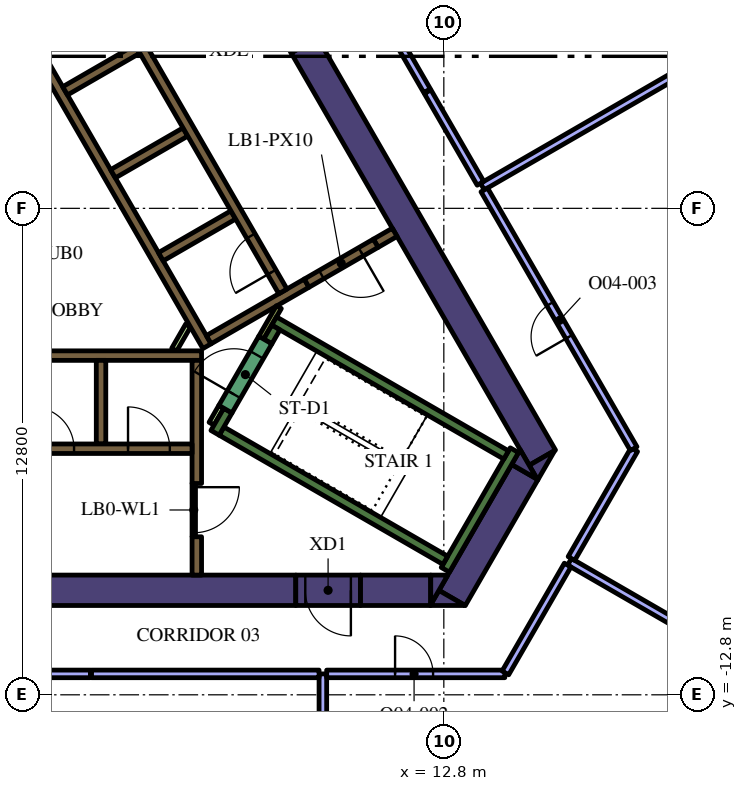
"""IFC4 building model, lengths in metres.
Left out: names, types, materials, properties, quantities, classifications, styles, units other than length and angle.
Written with IfcOpenShell. Run it as: python <this file> out.ifc"""

import sys

from ifc_helpers import new_model, si_unit, direction, frame, frame_2d, origin, place, context, subcontext, project, spatial, polyline, rectangle, outline, extrude, element, fill, save


model = new_model("IFC4")
c1 = context("Model", 3, precision=1e-05, world=origin(), true_north=direction((0.0, 1.0)))
c2 = subcontext(c1, "Body", "Model", "MODEL_VIEW")
j1 = project(units=[si_unit("LENGTHUNIT", "METRE"), si_unit("PLANEANGLEUNIT", "RADIAN")], contexts=[c1])
p1 = place(None, origin())
s1 = spatial("IfcSite", under=j1, at=p1, CompositionType="ELEMENT")
p2 = place(p1, origin())
s2 = spatial("IfcBuilding", under=s1, at=p2, CompositionType="ELEMENT")
p3 = place(p2, frame((0.0, 0.0, 183.6)))
s3 = spatial("IfcBuildingStorey", under=s2, at=p3, CompositionType="ELEMENT", Elevation=183.6)
p4 = place(p3, frame((9.129, 4.289, 0.0), z_axis=(0.0, 0.0, 1.0), x_axis=(0.499995742806, -0.866027861663, 0.0)))
e1 = element("IfcWall", 1, at=p4, inside=s3, PredefinedType="SOLIDWALL", context=c2, shape_type="SweptSolid", body=[
    extrude(rectangle(XDim=12.527, YDim=0.8, at=frame_2d((6.264, 0.0))), origin(), (0.0, 0.0, 1.0), 4.2),
])
p5 = place(p3, origin())
e2 = element("IfcWall", 2, at=p5, inside=s3, PredefinedType="SOLIDWALL", context=c2, shape_type="SweptSolid", body=[
    extrude(outline(polyline([(15.271, -7.15), (15.047, -6.762), (15.719, -6.374), (15.271, -7.15)])), origin(), (0.0, 0.0, 1.0), 4.2),
])
p6 = place(p3, frame((13.018, -10.252, 0.0), z_axis=(0.0, 0.0, 1.0), x_axis=(0.499984020225, 0.866034629516, 0.0)))
e3 = element("IfcWall", 3, at=p6, inside=s3, PredefinedType="SOLIDWALL", context=c2, shape_type="SweptSolid", body=[
    extrude(rectangle(XDim=3.824, YDim=0.8, at=frame_2d((1.912, 0.0))), origin(), (0.0, 0.0, 1.0), 4.2),
])
e4 = element("IfcWall", 4, at=p5, inside=s3, PredefinedType="SOLIDWALL", context=c2, shape_type="SweptSolid", body=[
    extrude(outline(polyline([(12.671, -10.053), (13.358, -10.45), (12.442, -10.45), (12.671, -10.053)])), origin(), (0.0, 0.0, 1.0), 4.2),
])
e5 = element("IfcWall", 5, at=p5, inside=s3, PredefinedType="SOLIDWALL", context=c2, shape_type="SweptSolid", body=[
    extrude(outline(polyline([(14.809, -6.35), (15.257, -7.126), (14.585, -6.738), (14.809, -6.35)])), origin(), (0.0, 0.0, 1.0), 4.2),
])
p7 = place(p3, frame((10.604, -10.05, 0.0), z_axis=(0.0, 0.0, 1.0), x_axis=(1.0, 0.0, 0.0)))
e6 = element("IfcWall", 6, at=p7, inside=s3, PredefinedType="SOLIDWALL", context=c2, shape_type="SweptSolid", body=[
    extrude(rectangle(XDim=1.849, YDim=0.8, at=frame_2d((0.925, 0.0))), origin(), (0.0, 0.0, 1.0), 4.2),
])
e7 = element("IfcWall", 7, at=p5, inside=s3, PredefinedType="SOLIDWALL", context=c2, shape_type="SweptSolid", body=[
    extrude(outline(polyline([(12.904, -9.65), (12.456, -10.426), (12.456, -9.65), (12.904, -9.65)])), origin(), (0.0, 0.0, 1.0), 4.2),
])
p8 = place(p3, frame((-13.378, -10.05, 0.0), z_axis=(0.0, 0.0, 1.0), x_axis=(1.0, 0.0, 0.0)))
e8 = element("IfcWall", 8, at=p8, inside=s3, PredefinedType="SOLIDWALL", context=c2, shape_type="SweptSolid", body=[
    extrude(rectangle(XDim=22.282, YDim=0.8, at=frame_2d((11.141, 0.0))), origin(), (0.0, 0.0, 1.0), 4.2),
])
p9 = place(p3, frame((12.84, -9.511, 0.0), z_axis=(0.0, 0.0, 1.0), x_axis=(0.499997733992, 0.866026712061, 0.0)))
e9 = element("IfcWall", 9, at=p9, inside=s3, PredefinedType="SOLIDWALL", context=c2, shape_type="SweptSolid", body=[
    extrude(rectangle(XDim=3.634, YDim=0.25, at=frame_2d((1.817, 0.0))), origin(), (0.0, 0.0, 1.0), 4.2),
])
p10 = place(p3, frame((12.84, -9.261, 0.0), z_axis=(0.0, 0.0, 1.0), x_axis=(-0.866013990052, 0.500019768644, 0.0)))
e10 = element("IfcWall", 10, at=p10, inside=s3, PredefinedType="SOLIDWALL", context=c2, shape_type="SweptSolid", body=[
    extrude(rectangle(XDim=6.8, YDim=0.25, at=frame_2d((3.4, 0.0))), origin(), (0.0, 0.0, 1.0), 4.2),
])
p11 = place(p3, frame((6.78, -5.906, 0.0), z_axis=(0.0, 0.0, 1.0), x_axis=(0.500223362819, 0.865896406789, 0.0)))
e11 = element("IfcWall", 11, at=p11, inside=s3, PredefinedType="SOLIDWALL", context=c2, shape_type="SweptSolid", body=[
    extrude(rectangle(XDim=0.675, YDim=0.25, at=frame_2d((0.337, 0.0))), origin(), (0.0, 0.0, 1.0), 4.2),
])
p12 = place(p3, frame((8.334, -2.964, 0.0), z_axis=(0.0, 0.0, 1.0), x_axis=(0.866016039709, -0.500016218704, 0.0)))
e12 = element("IfcWall", 12, at=p12, inside=s3, PredefinedType="SOLIDWALL", context=c2, shape_type="SweptSolid", body=[
    extrude(rectangle(XDim=7.05, YDim=0.25, at=frame_2d((3.525, 0.0))), origin(), (0.0, 0.0, 1.0), 4.2),
])
p13 = place(p3, frame((8.168, -3.503, 0.0), z_axis=(0.0, 0.0, 1.0), x_axis=(0.49972245349, 0.866185586049, 0.0)))
e13 = element("IfcWall", 13, at=p13, inside=s3, PredefinedType="SOLIDWALL", context=c2, shape_type="SweptSolid", body=[
    extrude(rectangle(XDim=0.425, YDim=0.25, at=frame_2d((0.212, 0.0))), origin(), (0.0, 0.0, 1.0), 4.2),
])
p14 = place(p3, frame((-5.545, -3.875, 0.0), z_axis=(0.0, 0.0, 1.0), x_axis=(1.0, 0.0, 0.0)))
e14 = element("IfcWall", 14, at=p14, inside=s3, PredefinedType="SOLIDWALL", context=c2, shape_type="SweptSolid", body=[
    extrude(rectangle(XDim=11.97, YDim=0.25, at=frame_2d((5.985, 0.0))), origin(), (0.0, 0.0, 1.0), 4.2),
])
p15 = place(p3, frame((6.3, -7.24, 0.0), z_axis=(0.0, 0.0, 1.0), x_axis=(0.0, 1.0, 0.0)))
e15 = element("IfcWall", 15, at=p15, inside=s3, PredefinedType="SOLIDWALL", context=c2, shape_type="SweptSolid", body=[
    extrude(rectangle(XDim=3.24, YDim=0.25, at=frame_2d((1.62, 0.0))), origin(), (0.0, 0.0, 1.0), 4.2),
])
p16 = place(p3, frame((6.3, -9.65, 0.0), z_axis=(0.0, 0.0, 1.0), x_axis=(0.0, 1.0, 0.0)))
e16 = element("IfcWall", 16, at=p16, inside=s3, PredefinedType="SOLIDWALL", context=c2, shape_type="SweptSolid", body=[
    extrude(rectangle(XDim=1.008, YDim=0.25, at=frame_2d((0.504, 0.0))), origin(), (0.0, 0.0, 1.0), 4.2),
])
p17 = place(p3, frame((3.78, -4.0, 0.0), z_axis=(0.0, 0.0, 1.0), x_axis=(0.0, -1.0, 0.0)))
e17 = element("IfcWall", 17, at=p17, inside=s3, PredefinedType="SOLIDWALL", context=c2, shape_type="SweptSolid", body=[
    extrude(rectangle(XDim=2.2, YDim=0.25, at=frame_2d((1.1, 0.0))), origin(), (0.0, 0.0, 1.0), 4.2),
])
p18 = place(p3, frame((11.507, -0.631, 0.0), z_axis=(0.0, 0.0, 1.0), x_axis=(-0.866093731455, -0.499881634324, 0.0)))
e18 = element("IfcWall", 18, at=p18, inside=s3, PredefinedType="SOLIDWALL", context=c2, shape_type="SweptSolid", body=[
    extrude(rectangle(XDim=0.575, YDim=0.25, at=frame_2d((0.288, 0.0))), origin(), (0.0, 0.0, 1.0), 4.2),
])
p19 = place(p3, frame((6.568, -3.627, 0.0), z_axis=(0.0, 0.0, 1.0), x_axis=(-0.499999455981, 0.866025717874, 0.0)))
e19 = element("IfcWall", 19, at=p19, inside=s3, PredefinedType="SOLIDWALL", context=c2, shape_type="SweptSolid", body=[
    extrude(rectangle(XDim=11.978, YDim=0.25, at=frame_2d((5.989, 0.0))), origin(), (0.0, 0.0, 1.0), 4.2),
])
for number, where, z_axis, x_axis in (
    (20, (2.834, 3.091, 0.0), (0.0, 0.0, 1.0), (0.866, 0.5, 0.0)),
    (21, (4.094, 0.909, 0.0), (0.0, 0.0, 1.0), (0.866, 0.5, 0.0)),
    (22, (5.354, -1.274, 0.0), (0.0, 0.0, 1.0), (0.866, 0.5, 0.0)),
):
    element("IfcWall", number, at=place(p3, frame(where, z_axis=z_axis, x_axis=x_axis)), inside=s3, PredefinedType="SOLIDWALL", context=c2, shape_type="SweptSolid", body=[
        extrude(rectangle(XDim=2.2, YDim=0.25, at=frame_2d((1.1, 0.0))), origin(), (0.0, 0.0, 1.0), 4.2),
    ])
p20 = place(p3, frame((6.614, -3.456, 0.0), z_axis=(0.0, 0.0, 1.0), x_axis=(0.866032512851, 0.499987686533, 0.0)))
e23 = element("IfcWall", 23, at=p20, inside=s3, PredefinedType="SOLIDWALL", context=c2, shape_type="SweptSolid", body=[
    extrude(rectangle(XDim=2.975, YDim=0.25, at=frame_2d((1.487, 0.0))), origin(), (0.0, 0.0, 1.0), 4.2),
])
p21 = place(p3, frame((6.945, -5.222, 0.0), z_axis=(0.0, 0.0, 1.0), x_axis=(-0.499818422106, -0.866130212453, 0.0)))
e24 = element("IfcWall", 24, at=p21, inside=s3, PredefinedType="PARTITIONING", context=c2, shape_type="SweptSolid", body=[
    extrude(rectangle(XDim=0.514, YDim=0.15, at=frame_2d((0.257, 0.0))), origin(), (0.0, 0.0, 1.0), 3.15),
])
p22 = place(p3, frame((8.459, -2.599, 0.0), z_axis=(0.0, 0.0, 1.0), x_axis=(-0.500041054325, -0.866001699761, 0.0)))
e25 = element("IfcWall", 25, at=p22, inside=s3, PredefinedType="PARTITIONING", context=c2, shape_type="SweptSolid", body=[
    extrude(rectangle(XDim=0.929, YDim=0.15, at=frame_2d((0.464, 0.0))), origin(), (0.0, 0.0, 1.0), 4.2),
])
p23 = place(p3, frame((5.705, -3.718, 0.0), z_axis=(0.0, 0.0, 1.0), x_axis=(0.499962090823, 0.866047289552, 0.0)))
e26 = element("IfcWall", 26, at=p23, inside=s3, PredefinedType="PARTITIONING", context=c2, shape_type="SweptSolid", body=[
    extrude(rectangle(XDim=0.735, YDim=0.15, at=frame_2d((0.367, 0.0))), origin(), (0.0, 0.0, 1.0), 3.15),
])
p24 = place(p3, frame((-6.175, -6.325, 0.0), z_axis=(0.0, 0.0, 1.0), x_axis=(1.0, 0.0, 0.0)))
e27 = element("IfcWall", 27, at=p24, inside=s3, PredefinedType="SOLIDWALL", context=c2, shape_type="SweptSolid", body=[
    extrude(rectangle(XDim=12.35, YDim=0.25, at=frame_2d((6.175, 0.0))), origin(), (0.0, 0.0, 1.0), 4.2),
])
p25 = place(p24, frame((0.585, 0.0, 0.0)))
e28 = element("IfcOpeningElement", 28, at=p25, cuts=e27, PredefinedType="OPENING", context=c2, shape_type="SweptSolid", body=[
    extrude(rectangle(XDim=1.1, YDim=2.1, at=frame_2d((0.55, 1.05))), frame((0.0, 0.135, 0.0), z_axis=(0.0, -1.0, 0.0), x_axis=(1.0, 0.0, 0.0)), (0.0, 0.0, 1.0), 0.27),
])
p26 = place(p24, frame((3.105, 0.0, 0.0)))
e29 = element("IfcOpeningElement", 29, at=p26, cuts=e27, PredefinedType="OPENING", context=c2, shape_type="SweptSolid", body=[
    extrude(rectangle(XDim=1.1, YDim=2.1, at=frame_2d((0.55, 1.05))), frame((0.0, 0.135, 0.0), z_axis=(0.0, -1.0, 0.0), x_axis=(1.0, 0.0, 0.0)), (0.0, 0.0, 1.0), 0.27),
])
p27 = place(p24, frame((5.625, 0.0, 0.0)))
e30 = element("IfcOpeningElement", 30, at=p27, cuts=e27, PredefinedType="OPENING", context=c2, shape_type="SweptSolid", body=[
    extrude(rectangle(XDim=1.1, YDim=2.1, at=frame_2d((0.55, 1.05))), frame((0.0, 0.135, 0.0), z_axis=(0.0, -1.0, 0.0), x_axis=(1.0, 0.0, 0.0)), (0.0, 0.0, 1.0), 0.27),
])
p28 = place(p24, frame((8.145, 0.0, 0.0)))
e31 = element("IfcOpeningElement", 31, at=p28, cuts=e27, PredefinedType="OPENING", context=c2, shape_type="SweptSolid", body=[
    extrude(rectangle(XDim=1.1, YDim=2.1, at=frame_2d((0.55, 1.05))), frame((0.0, 0.135, 0.0), z_axis=(0.0, -1.0, 0.0), x_axis=(1.0, 0.0, 0.0)), (0.0, 0.0, 1.0), 0.27),
])
p29 = place(p24, frame((10.665, 0.0, 0.0)))
e32 = element("IfcOpeningElement", 32, at=p29, cuts=e27, PredefinedType="OPENING", context=c2, shape_type="SweptSolid", body=[
    extrude(rectangle(XDim=1.1, YDim=2.1, at=frame_2d((0.55, 1.05))), frame((0.0, 0.135, 0.0), z_axis=(0.0, -1.0, 0.0), x_axis=(1.0, 0.0, 0.0)), (0.0, 0.0, 1.0), 0.27),
])
p30 = place(p3, frame((8.565, -2.185, 0.0), z_axis=(0.0, 0.0, 1.0), x_axis=(-0.499997954832, 0.866026584559, 0.0)))
e33 = element("IfcWall", 33, at=p30, inside=s3, PredefinedType="SOLIDWALL", context=c2, shape_type="SweptSolid", body=[
    extrude(rectangle(XDim=12.35, YDim=0.25, at=frame_2d((6.175, 0.0))), origin(), (0.0, 0.0, 1.0), 4.2),
])
p31 = place(p30, frame((0.585, 0.0, 0.0)))
e34 = element("IfcOpeningElement", 34, at=p31, cuts=e33, PredefinedType="OPENING", context=c2, shape_type="SweptSolid", body=[
    extrude(rectangle(XDim=1.1, YDim=2.1, at=frame_2d((0.55, 1.05))), frame((0.0, 0.135, 0.0), z_axis=(0.0, -1.0, 0.0), x_axis=(1.0, 0.0, 0.0)), (0.0, 0.0, 1.0), 0.27),
])
p32 = place(p3, frame((7.053, -5.284, 0.0), z_axis=(0.0, 0.0, 1.0), x_axis=(0.500078061341, 0.865980330357, 0.0)))
e35 = element("IfcWall", 35, at=p32, inside=s3, PredefinedType="SOLIDWALL", context=c2, shape_type="SweptSolid", body=[
    extrude(rectangle(XDim=2.1, YDim=0.4, at=frame_2d((1.05, 0.0))), origin(), (0.0, 0.0, 1.0), 4.2),
])
p33 = place(p32, frame((0.45, 0.0, 0.0)))
e36 = element("IfcOpeningElement", 36, at=p33, cuts=e35, PredefinedType="OPENING", context=c2, shape_type="SweptSolid", body=[
    extrude(rectangle(XDim=1.2, YDim=2.1, at=frame_2d((0.6, 1.05))), frame((0.0, 0.21, 0.0), z_axis=(0.0, -1.0, 0.0), x_axis=(1.0, 0.0, 0.0)), (0.0, 0.0, 1.0), 0.42),
])
p34 = place(p3, frame((6.22, -7.237, 0.0), z_axis=(0.0, 0.0, 1.0), x_axis=(0.0, -1.0, 0.0)))
e37 = element("IfcWall", 37, at=p34, inside=s3, PredefinedType="PARTITIONING", context=c2, shape_type="SweptSolid", body=[
    extrude(rectangle(XDim=1.4, YDim=0.09, at=frame_2d((0.7, 0.0))), origin(), (0.0, 0.0, 1.0), 3.15),
])
p35 = place(p34, frame((0.1, 0.0, 0.0)))
e38 = element("IfcOpeningElement", 38, at=p35, cuts=e37, PredefinedType="OPENING", context=c2, shape_type="SweptSolid", body=[
    extrude(rectangle(XDim=1.2, YDim=2.1, at=frame_2d((0.6, 1.05))), frame((0.0, 0.055, 0.0), z_axis=(0.0, -1.0, 0.0), x_axis=(1.0, 0.0, 0.0)), (0.0, 0.0, 1.0), 0.11),
])
p36 = place(p3, frame((11.009, -0.919, 0.0), z_axis=(0.0, 0.0, 1.0), x_axis=(-0.866059744384, -0.49994051562, 0.0)))
e39 = element("IfcWall", 39, at=p36, inside=s3, PredefinedType="SOLIDWALL", context=c2, shape_type="SweptSolid", body=[
    extrude(rectangle(XDim=2.1, YDim=0.25, at=frame_2d((1.05, 0.0))), origin(), (0.0, 0.0, 1.0), 4.2),
])
p37 = place(p36, frame((0.45, 0.0, 0.0)))
e40 = element("IfcOpeningElement", 40, at=p37, cuts=e39, PredefinedType="OPENING", context=c2, shape_type="SweptSolid", body=[
    extrude(rectangle(XDim=1.2, YDim=2.1, at=frame_2d((0.6, 1.05))), frame((0.0, 0.135, 0.0), z_axis=(0.0, -1.0, 0.0), x_axis=(1.0, 0.0, 0.0)), (0.0, 0.0, 1.0), 0.27),
])
p38 = place(p3, frame((10.604, -10.05, 0.0), z_axis=(0.0, 0.0, 1.0), x_axis=(-1.0, 0.0, 0.0)))
e41 = element("IfcWall", 41, at=p38, inside=s3, PredefinedType="SOLIDWALL", context=c2, shape_type="SweptSolid", body=[
    extrude(rectangle(XDim=1.7, YDim=0.8, at=frame_2d((0.85, 0.0))), origin(), (0.0, 0.0, 1.0), 4.2),
])
p39 = place(p38, frame((0.25, 0.0, 0.0)))
e42 = element("IfcOpeningElement", 42, at=p39, cuts=e41, PredefinedType="OPENING", context=c2, shape_type="SweptSolid", body=[
    extrude(rectangle(XDim=1.2, YDim=2.1, at=frame_2d((0.6, 1.05))), frame((0.0, 0.41, 0.0), z_axis=(0.0, -1.0, 0.0), x_axis=(1.0, 0.0, 0.0)), (0.0, 0.0, 1.0), 0.82),
])
p40 = place(p3, frame((8.279, 5.761, 0.0), z_axis=(0.0, 0.0, 1.0), x_axis=(0.500062241894, -0.865989465428, 0.0)))
e43 = element("IfcWall", 43, at=p40, inside=s3, PredefinedType="SOLIDWALL", context=c2, shape_type="SweptSolid", body=[
    extrude(rectangle(XDim=1.7, YDim=0.8, at=frame_2d((0.85, 0.0))), origin(), (0.0, 0.0, 1.0), 4.2),
])
p41 = place(p40, frame((0.25, 0.0, 0.0)))
e44 = element("IfcOpeningElement", 44, at=p41, cuts=e43, PredefinedType="OPENING", context=c2, shape_type="SweptSolid", body=[
    extrude(rectangle(XDim=1.2, YDim=2.1, at=frame_2d((0.6, 1.05))), frame((0.0, 0.41, 0.0), z_axis=(0.0, -1.0, 0.0), x_axis=(1.0, 0.0, 0.0)), (0.0, 0.0, 1.0), 0.82),
])
p42 = place(p3, frame((9.617, -12.25, 0.0), z_axis=(0.0, 0.0, 1.0), x_axis=(0.0, -1.0, 0.0)))
e45 = element("IfcWall", 45, at=p42, inside=s3, PredefinedType="PARTITIONING", context=c2, shape_type="SweptSolid", body=[
    extrude(rectangle(XDim=7.761, YDim=0.2, at=frame_2d((3.881, 0.0))), origin(), (0.0, 0.0, 1.0), 3.15),
])
p43 = place(p3, frame((-3.5, -12.25, 0.0), z_axis=(0.0, 0.0, 1.0), x_axis=(1.0, 0.0, 0.0)))
e46 = element("IfcWall", 46, at=p43, inside=s3, PredefinedType="PARTITIONING", context=c2, shape_type="SweptSolid", body=[
    extrude(rectangle(XDim=7.0, YDim=0.2, at=frame_2d((3.5, 0.0))), origin(), (0.0, 0.0, 1.0), 3.15),
])
p44 = place(p43, frame((3.0, 0.0, 0.0)))
e47 = element("IfcOpeningElement", 47, at=p44, cuts=e46, PredefinedType="OPENING", context=c2, shape_type="SweptSolid", body=[
    extrude(rectangle(XDim=1.0, YDim=2.1, at=frame_2d((0.5, 1.05))), frame((0.0, 0.11, 0.0), z_axis=(0.0, -1.0, 0.0), x_axis=(1.0, 0.0, 0.0)), (0.0, 0.0, 1.0), 0.22),
])
p45 = place(p3, frame((3.53, -12.25, 0.0), z_axis=(0.0, 0.0, 1.0), x_axis=(1.0, 0.0, 0.0)))
e48 = element("IfcWall", 48, at=p45, inside=s3, PredefinedType="PARTITIONING", context=c2, shape_type="SweptSolid", body=[
    extrude(rectangle(XDim=5.987, YDim=0.2, at=frame_2d((2.994, 0.0))), origin(), (0.0, 0.0, 1.0), 3.15),
])
p46 = place(p3, frame((16.108, -9.3, 0.0), z_axis=(0.0, 0.0, 1.0), x_axis=(0.866027180319, -0.499996922939, 0.0)))
e49 = element("IfcWall", 49, at=p46, inside=s3, PredefinedType="PARTITIONING", context=c2, shape_type="SweptSolid", body=[
    extrude(rectangle(XDim=10.754, YDim=0.2, at=frame_2d((5.377, 0.0))), origin(), (0.0, 0.0, 1.0), 3.15),
])
p47 = place(p3, frame((9.717, -12.25, 0.0), z_axis=(0.0, 0.0, 1.0), x_axis=(1.0, 0.0, 0.0)))
e50 = element("IfcWall", 50, at=p47, inside=s3, PredefinedType="PARTITIONING", context=c2, shape_type="SweptSolid", body=[
    extrude(rectangle(XDim=4.688, YDim=0.2, at=frame_2d((2.344, 0.0))), origin(), (0.0, 0.0, 1.0), 3.15),
])
p48 = place(p47, frame((1.8, 0.0, 0.0)))
e51 = element("IfcOpeningElement", 51, at=p48, cuts=e50, PredefinedType="OPENING", context=c2, shape_type="SweptSolid", body=[
    extrude(rectangle(XDim=1.0, YDim=2.1, at=frame_2d((0.5, 1.05))), frame((0.0, 0.11, 0.0), z_axis=(0.0, -1.0, 0.0), x_axis=(1.0, 0.0, 0.0)), (0.0, 0.0, 1.0), 0.22),
])
p49 = place(p3, frame((14.42, -12.224, 0.0), z_axis=(0.0, 0.0, 1.0), x_axis=(0.500001965626, 0.866024268927, 0.0)))
e52 = element("IfcWall", 52, at=p49, inside=s3, PredefinedType="PARTITIONING", context=c2, shape_type="SweptSolid", body=[
    extrude(rectangle(XDim=3.276, YDim=0.2, at=frame_2d((1.638, 0.0))), origin(), (0.0, 0.0, 1.0), 3.15),
])
p50 = place(p3, frame((13.815, 0.572, 0.0), z_axis=(0.0, 0.0, 1.0), x_axis=(0.866036391575, 0.499980968105, 0.0)))
e53 = element("IfcWall", 53, at=p50, inside=s3, PredefinedType="PARTITIONING", context=c2, shape_type="SweptSolid", body=[
    extrude(rectangle(XDim=8.42, YDim=0.2, at=frame_2d((4.21, 0.0))), origin(), (0.0, 0.0, 1.0), 3.15),
])
p51 = place(p3, frame((16.158, -9.213, 0.0), z_axis=(0.0, 0.0, 1.0), x_axis=(0.499990919662, 0.866030646256, 0.0)))
e54 = element("IfcWall", 54, at=p51, inside=s3, PredefinedType="PARTITIONING", context=c2, shape_type="SweptSolid", body=[
    extrude(rectangle(XDim=3.306, YDim=0.2, at=frame_2d((1.653, 0.0))), origin(), (0.0, 0.0, 1.0), 3.15),
])
p52 = place(p3, frame((17.796, -6.324, 0.0), z_axis=(0.0, 0.0, 1.0), x_axis=(-0.500026166427, 0.866010296064, 0.0)))
e55 = element("IfcWall", 55, at=p52, inside=s3, PredefinedType="PARTITIONING", context=c2, shape_type="SweptSolid", body=[
    extrude(rectangle(XDim=7.863, YDim=0.2, at=frame_2d((3.931, 0.0))), origin(), (0.0, 0.0, 1.0), 3.15),
])
p53 = place(p52, frame((3.4, 0.0, 0.0)))
e56 = element("IfcOpeningElement", 56, at=p53, cuts=e55, PredefinedType="OPENING", context=c2, shape_type="SweptSolid", body=[
    extrude(rectangle(XDim=1.0, YDim=2.1, at=frame_2d((0.5, 1.05))), frame((0.0, 0.11, 0.0), z_axis=(0.0, -1.0, 0.0), x_axis=(1.0, 0.0, 0.0)), (0.0, 0.0, 1.0), 0.22),
])
p54 = place(p3, frame((12.359, 3.094, 0.0), z_axis=(0.0, 0.0, 1.0), x_axis=(-0.500010275428, 0.866019471182, 0.0)))
e57 = element("IfcWall", 57, at=p54, inside=s3, PredefinedType="PARTITIONING", context=c2, shape_type="SweptSolid", body=[
    extrude(rectangle(XDim=7.0, YDim=0.2, at=frame_2d((3.5, 0.0))), origin(), (0.0, 0.0, 1.0), 3.15),
])
p55 = place(p3, frame((13.765, 0.659, 0.0), z_axis=(0.0, 0.0, 1.0), x_axis=(-0.500046568876, 0.865998515562, 0.0)))
e58 = element("IfcWall", 58, at=p55, inside=s3, PredefinedType="PARTITIONING", context=c2, shape_type="SweptSolid", body=[
    extrude(rectangle(XDim=2.782, YDim=0.2, at=frame_2d((1.391, 0.0))), origin(), (0.0, 0.0, 1.0), 3.15),
])
p56 = place(p28, origin())
e59 = element("IfcDoor", 59, at=p56, inside=s3, OperationType="DOUBLE_DOOR_SLIDING", PredefinedType="DOOR", context=c2, shape_type="SweptSolid", body=[
    extrude(rectangle(XDim=1.1, YDim=2.1, at=frame_2d((0.55, 1.05))), frame((0.0, 0.025, 0.0), z_axis=(0.0, -1.0, 0.0), x_axis=(1.0, 0.0, 0.0)), (0.0, 0.0, 1.0), 0.05),
])
fill(e31, e59)
p57 = place(p29, origin())
e60 = element("IfcDoor", 60, at=p57, inside=s3, OperationType="DOUBLE_DOOR_SLIDING", PredefinedType="DOOR", context=c2, shape_type="SweptSolid", body=[
    extrude(rectangle(XDim=1.1, YDim=2.1, at=frame_2d((0.55, 1.05))), frame((0.0, 0.025, 0.0), z_axis=(0.0, -1.0, 0.0), x_axis=(1.0, 0.0, 0.0)), (0.0, 0.0, 1.0), 0.05),
])
fill(e32, e60)
p58 = place(p31, origin())
e61 = element("IfcDoor", 61, at=p58, inside=s3, OperationType="DOUBLE_DOOR_SLIDING", PredefinedType="DOOR", context=c2, shape_type="SweptSolid", body=[
    extrude(rectangle(XDim=1.1, YDim=2.1, at=frame_2d((0.55, 1.05))), frame((0.0, 0.025, 0.0), z_axis=(0.0, -1.0, 0.0), x_axis=(1.0, 0.0, 0.0)), (0.0, 0.0, 1.0), 0.05),
])
fill(e34, e61)
p59 = place(p33, origin())
e62 = element("IfcDoor", 62, at=p59, inside=s3, OperationType="SINGLE_SWING_LEFT", PredefinedType="DOOR", context=c2, shape_type="SweptSolid", body=[
    extrude(rectangle(XDim=1.2, YDim=2.1, at=frame_2d((0.6, 1.05))), frame((0.0, 0.025, 0.0), z_axis=(0.0, -1.0, 0.0), x_axis=(1.0, 0.0, 0.0)), (0.0, 0.0, 1.0), 0.05),
])
fill(e36, e62)
p60 = place(p35, origin())
e63 = element("IfcDoor", 63, at=p60, inside=s3, OperationType="SINGLE_SWING_LEFT", PredefinedType="DOOR", context=c2, shape_type="SweptSolid", body=[
    extrude(rectangle(XDim=1.2, YDim=2.1, at=frame_2d((0.6, 1.05))), frame((0.0, 0.025, 0.0), z_axis=(0.0, -1.0, 0.0), x_axis=(1.0, 0.0, 0.0)), (0.0, 0.0, 1.0), 0.05),
])
fill(e38, e63)
p61 = place(p37, origin())
e64 = element("IfcDoor", 64, at=p61, inside=s3, OperationType="SINGLE_SWING_LEFT", PredefinedType="DOOR", context=c2, shape_type="SweptSolid", body=[
    extrude(rectangle(XDim=1.2, YDim=2.1, at=frame_2d((0.6, 1.05))), frame((0.0, 0.025, 0.0), z_axis=(0.0, -1.0, 0.0), x_axis=(1.0, 0.0, 0.0)), (0.0, 0.0, 1.0), 0.05),
])
fill(e40, e64)
p62 = place(p39, origin())
e65 = element("IfcDoor", 65, at=p62, inside=s3, OperationType="SINGLE_SWING_LEFT", PredefinedType="DOOR", context=c2, shape_type="SweptSolid", body=[
    extrude(rectangle(XDim=1.2, YDim=2.1, at=frame_2d((0.6, 1.05))), frame((0.0, 0.025, 0.0), z_axis=(0.0, -1.0, 0.0), x_axis=(1.0, 0.0, 0.0)), (0.0, 0.0, 1.0), 0.05),
])
fill(e42, e65)
p63 = place(p48, origin())
e66 = element("IfcDoor", 66, at=p63, inside=s3, OperationType="SINGLE_SWING_LEFT", PredefinedType="DOOR", context=c2, shape_type="SweptSolid", body=[
    extrude(rectangle(XDim=1.0, YDim=2.1, at=frame_2d((0.5, 1.05))), frame((0.0, 0.025, 0.0), z_axis=(0.0, -1.0, 0.0), x_axis=(1.0, 0.0, 0.0)), (0.0, 0.0, 1.0), 0.05),
])
fill(e51, e66)
p64 = place(p53, origin())
e67 = element("IfcDoor", 67, at=p64, inside=s3, OperationType="SINGLE_SWING_LEFT", PredefinedType="DOOR", context=c2, shape_type="SweptSolid", body=[
    extrude(rectangle(XDim=1.0, YDim=2.1, at=frame_2d((0.5, 1.05))), frame((0.0, 0.025, 0.0), z_axis=(0.0, -1.0, 0.0), x_axis=(1.0, 0.0, 0.0)), (0.0, 0.0, 1.0), 0.05),
])
fill(e56, e67)
save(model, sys.argv[1])
